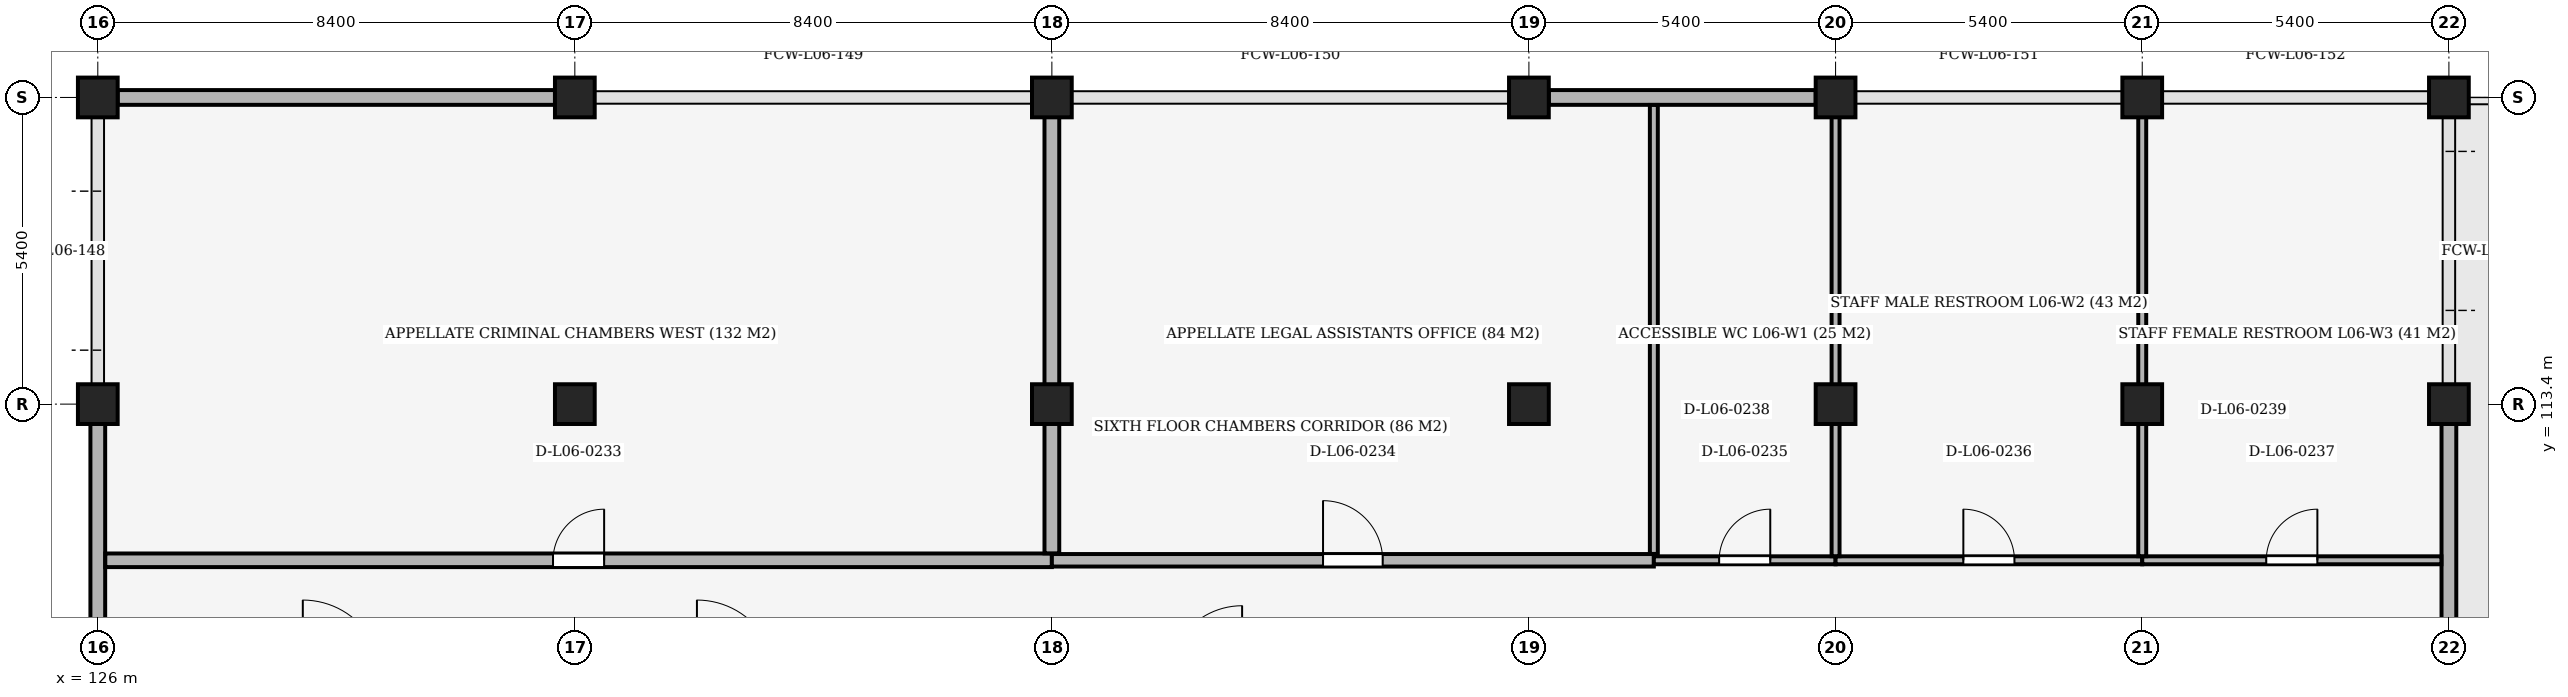
"""IFC4 building model, lengths in metres.
Left out: names, types, materials, properties, quantities, classifications, styles, units other than length and angle.
Written with IfcOpenShell. Run it as: python <this file> out.ifc"""

import sys

from ifc_helpers import new_model, si_unit, direction, frame, frame_2d, origin, origin_2d, place, context, subcontext, project, spatial, rectangle, extrude, element, fill, save


model = new_model("IFC4")
c1 = context("Model", 3, precision=1e-05, world=origin(), true_north=direction((0.0, 1.0)))
c2 = subcontext(c1, "Body", "Model", "MODEL_VIEW")
j1 = project(units=[si_unit("LENGTHUNIT", "METRE"), si_unit("PLANEANGLEUNIT", "RADIAN")], contexts=[c1])
p1 = place(None, origin())
s1 = spatial("IfcSite", under=j1, at=p1, CompositionType="ELEMENT")
p2 = place(p1, origin())
s2 = spatial("IfcBuilding", under=s1, at=p2, CompositionType="ELEMENT")
p3 = place(p2, frame((0.0, 0.0, 29.4)))
s3 = spatial("IfcBuildingStorey", under=s2, at=p3, CompositionType="ELEMENT", Elevation=29.4)
for number, where, z_axis, x_axis in (
    (1, (126.0, 113.4, 0.0), (0.0, 0.0, 1.0), (1.0, 0.0, 0.0)),
    (2, (126.0, 118.8, 0.0), (0.0, 0.0, 1.0), (1.0, 0.0, 0.0)),
    (3, (134.4, 113.4, 0.0), (0.0, 0.0, 1.0), (1.0, 0.0, 0.0)),
    (4, (134.4, 118.8, 0.0), (0.0, 0.0, 1.0), (1.0, 0.0, 0.0)),
    (5, (142.8, 113.4, 0.0), (0.0, 0.0, 1.0), (1.0, 0.0, 0.0)),
    (6, (142.8, 118.8, 0.0), (0.0, 0.0, 1.0), (1.0, 0.0, 0.0)),
    (7, (151.2, 113.4, 0.0), (0.0, 0.0, 1.0), (1.0, 0.0, 0.0)),
    (8, (151.2, 118.8, 0.0), (0.0, 0.0, 1.0), (1.0, 0.0, 0.0)),
    (9, (156.6, 113.4, 0.0), (0.0, 0.0, 1.0), (1.0, 0.0, 0.0)),
    (10, (156.6, 118.8, 0.0), (0.0, 0.0, 1.0), (1.0, 0.0, 0.0)),
    (11, (162.0, 113.4, 0.0), (0.0, 0.0, 1.0), (1.0, 0.0, 0.0)),
    (12, (162.0, 118.8, 0.0), (0.0, 0.0, 1.0), (1.0, 0.0, 0.0)),
    (13, (167.4, 113.4, 0.0), (0.0, 0.0, 1.0), (1.0, 0.0, 0.0)),
    (14, (167.4, 118.8, 0.0), (0.0, 0.0, 1.0), (1.0, 0.0, 0.0)),
):
    element("IfcColumn", number, at=place(p3, frame(where, z_axis=z_axis, x_axis=x_axis)), inside=s3, PredefinedType="COLUMN", context=c2, shape_type="SweptSolid", body=[
        extrude(rectangle(XDim=0.7, YDim=0.7, at=origin_2d()), origin(), (0.0, 0.0, 1.0), 4.2),
    ])
p4 = place(p3, frame((126.0, 108.35, 0.0), z_axis=(0.0, 0.0, 1.0), x_axis=(0.0, 1.0, 0.0)))
e15 = element("IfcWall", 15, at=p4, inside=s3, PredefinedType="SOLIDWALL", context=c2, shape_type="SweptSolid", body=[
    extrude(rectangle(XDim=4.7, YDim=0.26, at=frame_2d((2.35, 0.0))), origin(), (0.0, 0.0, 1.0), 3.4),
])
p5 = place(p3, frame((126.35, 118.8, 0.0), z_axis=(0.0, 0.0, 1.0), x_axis=(1.0, 0.0, 0.0)))
e16 = element("IfcWall", 16, at=p5, inside=s3, PredefinedType="SOLIDWALL", context=c2, shape_type="SweptSolid", body=[
    extrude(rectangle(XDim=7.7, YDim=0.26, at=frame_2d((3.85, 0.0))), origin(), (0.0, 0.0, 1.0), 3.25),
])
p6 = place(p3, frame((151.55, 118.8, 0.0), z_axis=(0.0, 0.0, 1.0), x_axis=(1.0, 0.0, 0.0)))
e17 = element("IfcWall", 17, at=p6, inside=s3, PredefinedType="SOLIDWALL", context=c2, shape_type="SweptSolid", body=[
    extrude(rectangle(XDim=4.7, YDim=0.26, at=frame_2d((2.35, 0.0))), origin(), (0.0, 0.0, 1.0), 3.35),
])
p7 = place(p3, frame((167.4, 113.05, 0.0), z_axis=(0.0, 0.0, 1.0), x_axis=(0.0, -1.0, 0.0)))
e18 = element("IfcWall", 18, at=p7, inside=s3, PredefinedType="SOLIDWALL", context=c2, shape_type="SweptSolid", body=[
    extrude(rectangle(XDim=4.7, YDim=0.26, at=frame_2d((2.35, 0.0))), origin(), (0.0, 0.0, 1.0), 3.4),
])
p8 = place(p3, frame((126.132, 110.65, 0.0), z_axis=(0.0, 0.0, 1.0), x_axis=(1.0, 0.0, 0.0)))
e19 = element("IfcWall", 19, at=p8, inside=s3, PredefinedType="PARTITIONING", context=c2, shape_type="SweptSolid", body=[
    extrude(rectangle(XDim=16.668, YDim=0.24, at=frame_2d((8.334, 0.0))), origin(), (0.0, 0.0, 1.0), 3.4),
])
p9 = place(p8, frame((7.884, 0.0, 0.0)))
e20 = element("IfcOpeningElement", 20, at=p9, cuts=e19, PredefinedType="OPENING", context=c2, shape_type="SweptSolid", body=[
    extrude(rectangle(XDim=0.9, YDim=2.1, at=frame_2d((0.45, 1.05))), frame((0.0, 0.135, 0.0), z_axis=(0.0, -1.0, 0.0), x_axis=(1.0, 0.0, 0.0)), (0.0, 0.0, 1.0), 0.27),
])
p10 = place(p3, frame((142.8, 110.65, 0.0), z_axis=(0.0, 0.0, 1.0), x_axis=(1.0, 0.0, 0.0)))
e21 = element("IfcWall", 21, at=p10, inside=s3, PredefinedType="PARTITIONING", context=c2, shape_type="SweptSolid", body=[
    extrude(rectangle(XDim=10.6, YDim=0.22, at=frame_2d((5.3, 0.0))), origin(), (0.0, 0.0, 1.0), 3.4),
])
p11 = place(p10, frame((4.775, 0.0, 0.0)))
e22 = element("IfcOpeningElement", 22, at=p11, cuts=e21, PredefinedType="OPENING", context=c2, shape_type="SweptSolid", body=[
    extrude(rectangle(XDim=1.05, YDim=2.1, at=frame_2d((0.525, 1.05))), frame((0.0, 0.125, 0.0), z_axis=(0.0, -1.0, 0.0), x_axis=(1.0, 0.0, 0.0)), (0.0, 0.0, 1.0), 0.25),
])
p12 = place(p3, frame((153.4, 110.65, 0.0), z_axis=(0.0, 0.0, 1.0), x_axis=(1.0, 0.0, 0.0)))
e23 = element("IfcWall", 23, at=p12, inside=s3, PredefinedType="PARTITIONING", context=c2, shape_type="SweptSolid", body=[
    extrude(rectangle(XDim=3.2, YDim=0.14, at=frame_2d((1.6, 0.0))), origin(), (0.0, 0.0, 1.0), 3.4),
])
p13 = place(p12, frame((1.15, 0.0, 0.0)))
e24 = element("IfcOpeningElement", 24, at=p13, cuts=e23, PredefinedType="OPENING", context=c2, shape_type="SweptSolid", body=[
    extrude(rectangle(XDim=0.9, YDim=2.1, at=frame_2d((0.45, 1.05))), frame((0.0, 0.085, 0.0), z_axis=(0.0, -1.0, 0.0), x_axis=(1.0, 0.0, 0.0)), (0.0, 0.0, 1.0), 0.17),
])
p14 = place(p3, frame((156.6, 110.65, 0.0), z_axis=(0.0, 0.0, 1.0), x_axis=(1.0, 0.0, 0.0)))
e25 = element("IfcWall", 25, at=p14, inside=s3, PredefinedType="PARTITIONING", context=c2, shape_type="SweptSolid", body=[
    extrude(rectangle(XDim=5.4, YDim=0.14, at=frame_2d((2.7, 0.0))), origin(), (0.0, 0.0, 1.0), 3.4),
])
p15 = place(p14, frame((2.25, 0.0, 0.0)))
e26 = element("IfcOpeningElement", 26, at=p15, cuts=e25, PredefinedType="OPENING", context=c2, shape_type="SweptSolid", body=[
    extrude(rectangle(XDim=0.9, YDim=2.1, at=frame_2d((0.45, 1.05))), frame((0.0, 0.085, 0.0), z_axis=(0.0, -1.0, 0.0), x_axis=(1.0, 0.0, 0.0)), (0.0, 0.0, 1.0), 0.17),
])
p16 = place(p3, frame((162.0, 110.65, 0.0), z_axis=(0.0, 0.0, 1.0), x_axis=(1.0, 0.0, 0.0)))
e27 = element("IfcWall", 27, at=p16, inside=s3, PredefinedType="PARTITIONING", context=c2, shape_type="SweptSolid", body=[
    extrude(rectangle(XDim=5.268, YDim=0.14, at=frame_2d((2.634, 0.0))), origin(), (0.0, 0.0, 1.0), 3.4),
])
p17 = place(p16, frame((2.184, 0.0, 0.0)))
e28 = element("IfcOpeningElement", 28, at=p17, cuts=e27, PredefinedType="OPENING", context=c2, shape_type="SweptSolid", body=[
    extrude(rectangle(XDim=0.9, YDim=2.1, at=frame_2d((0.45, 1.05))), frame((0.0, 0.085, 0.0), z_axis=(0.0, -1.0, 0.0), x_axis=(1.0, 0.0, 0.0)), (0.0, 0.0, 1.0), 0.17),
])
p18 = place(p3, frame((142.8, 110.772, 0.0), z_axis=(0.0, 0.0, 1.0), x_axis=(0.0, 1.0, 0.0)))
e29 = element("IfcWall", 29, at=p18, inside=s3, PredefinedType="PARTITIONING", context=c2, shape_type="SweptSolid", body=[
    extrude(rectangle(XDim=8.126, YDim=0.26, at=frame_2d((4.063, 0.0))), origin(), (0.0, 0.0, 1.0), 3.4),
])
p19 = place(p3, frame((153.4, 110.762, 0.0), z_axis=(0.0, 0.0, 1.0), x_axis=(0.0, 1.0, 0.0)))
e30 = element("IfcWall", 30, at=p19, inside=s3, PredefinedType="PARTITIONING", context=c2, shape_type="SweptSolid", body=[
    extrude(rectangle(XDim=7.906, YDim=0.14, at=frame_2d((3.953, 0.0))), origin(), (0.0, 0.0, 1.0), 3.35),
])
p20 = place(p3, frame((156.6, 110.722, 0.0), z_axis=(0.0, 0.0, 1.0), x_axis=(0.0, 1.0, 0.0)))
e31 = element("IfcWall", 31, at=p20, inside=s3, PredefinedType="PARTITIONING", context=c2, shape_type="SweptSolid", body=[
    extrude(rectangle(XDim=8.156, YDim=0.14, at=frame_2d((4.078, 0.0))), origin(), (0.0, 0.0, 1.0), 3.4),
])
p21 = place(p3, frame((162.0, 110.722, 0.0), z_axis=(0.0, 0.0, 1.0), x_axis=(0.0, 1.0, 0.0)))
e32 = element("IfcWall", 32, at=p21, inside=s3, PredefinedType="PARTITIONING", context=c2, shape_type="SweptSolid", body=[
    extrude(rectangle(XDim=8.176, YDim=0.14, at=frame_2d((4.088, 0.0))), origin(), (0.0, 0.0, 1.0), 3.4),
])
p22 = place(p9, origin())
e33 = element("IfcDoor", 33, at=p22, inside=s3, OperationType="SINGLE_SWING_RIGHT", PredefinedType="DOOR", context=c2, shape_type="SweptSolid", body=[
    extrude(rectangle(XDim=0.9, YDim=2.1, at=frame_2d((0.45, 1.05))), frame((0.0, 0.025, 0.0), z_axis=(0.0, -1.0, 0.0), x_axis=(1.0, 0.0, 0.0)), (0.0, 0.0, 1.0), 0.05),
])
fill(e20, e33)
p23 = place(p11, origin())
e34 = element("IfcDoor", 34, at=p23, inside=s3, OperationType="SINGLE_SWING_LEFT", PredefinedType="DOOR", context=c2, shape_type="SweptSolid", body=[
    extrude(rectangle(XDim=1.05, YDim=2.1, at=frame_2d((0.525, 1.05))), frame((0.0, 0.025, 0.0), z_axis=(0.0, -1.0, 0.0), x_axis=(1.0, 0.0, 0.0)), (0.0, 0.0, 1.0), 0.05),
])
fill(e22, e34)
p24 = place(p13, origin())
e35 = element("IfcDoor", 35, at=p24, inside=s3, OperationType="SINGLE_SWING_RIGHT", PredefinedType="DOOR", context=c2, shape_type="SweptSolid", body=[
    extrude(rectangle(XDim=0.9, YDim=2.1, at=frame_2d((0.45, 1.05))), frame((0.0, 0.025, 0.0), z_axis=(0.0, -1.0, 0.0), x_axis=(1.0, 0.0, 0.0)), (0.0, 0.0, 1.0), 0.05),
])
fill(e24, e35)
p25 = place(p15, origin())
e36 = element("IfcDoor", 36, at=p25, inside=s3, OperationType="SINGLE_SWING_LEFT", PredefinedType="DOOR", context=c2, shape_type="SweptSolid", body=[
    extrude(rectangle(XDim=0.9, YDim=2.1, at=frame_2d((0.45, 1.05))), frame((0.0, 0.025, 0.0), z_axis=(0.0, -1.0, 0.0), x_axis=(1.0, 0.0, 0.0)), (0.0, 0.0, 1.0), 0.05),
])
fill(e26, e36)
p26 = place(p17, origin())
e37 = element("IfcDoor", 37, at=p26, inside=s3, OperationType="SINGLE_SWING_RIGHT", PredefinedType="DOOR", context=c2, shape_type="SweptSolid", body=[
    extrude(rectangle(XDim=0.9, YDim=2.1, at=frame_2d((0.45, 1.05))), frame((0.0, 0.025, 0.0), z_axis=(0.0, -1.0, 0.0), x_axis=(1.0, 0.0, 0.0)), (0.0, 0.0, 1.0), 0.05),
])
fill(e28, e37)
save(model, sys.argv[1])
